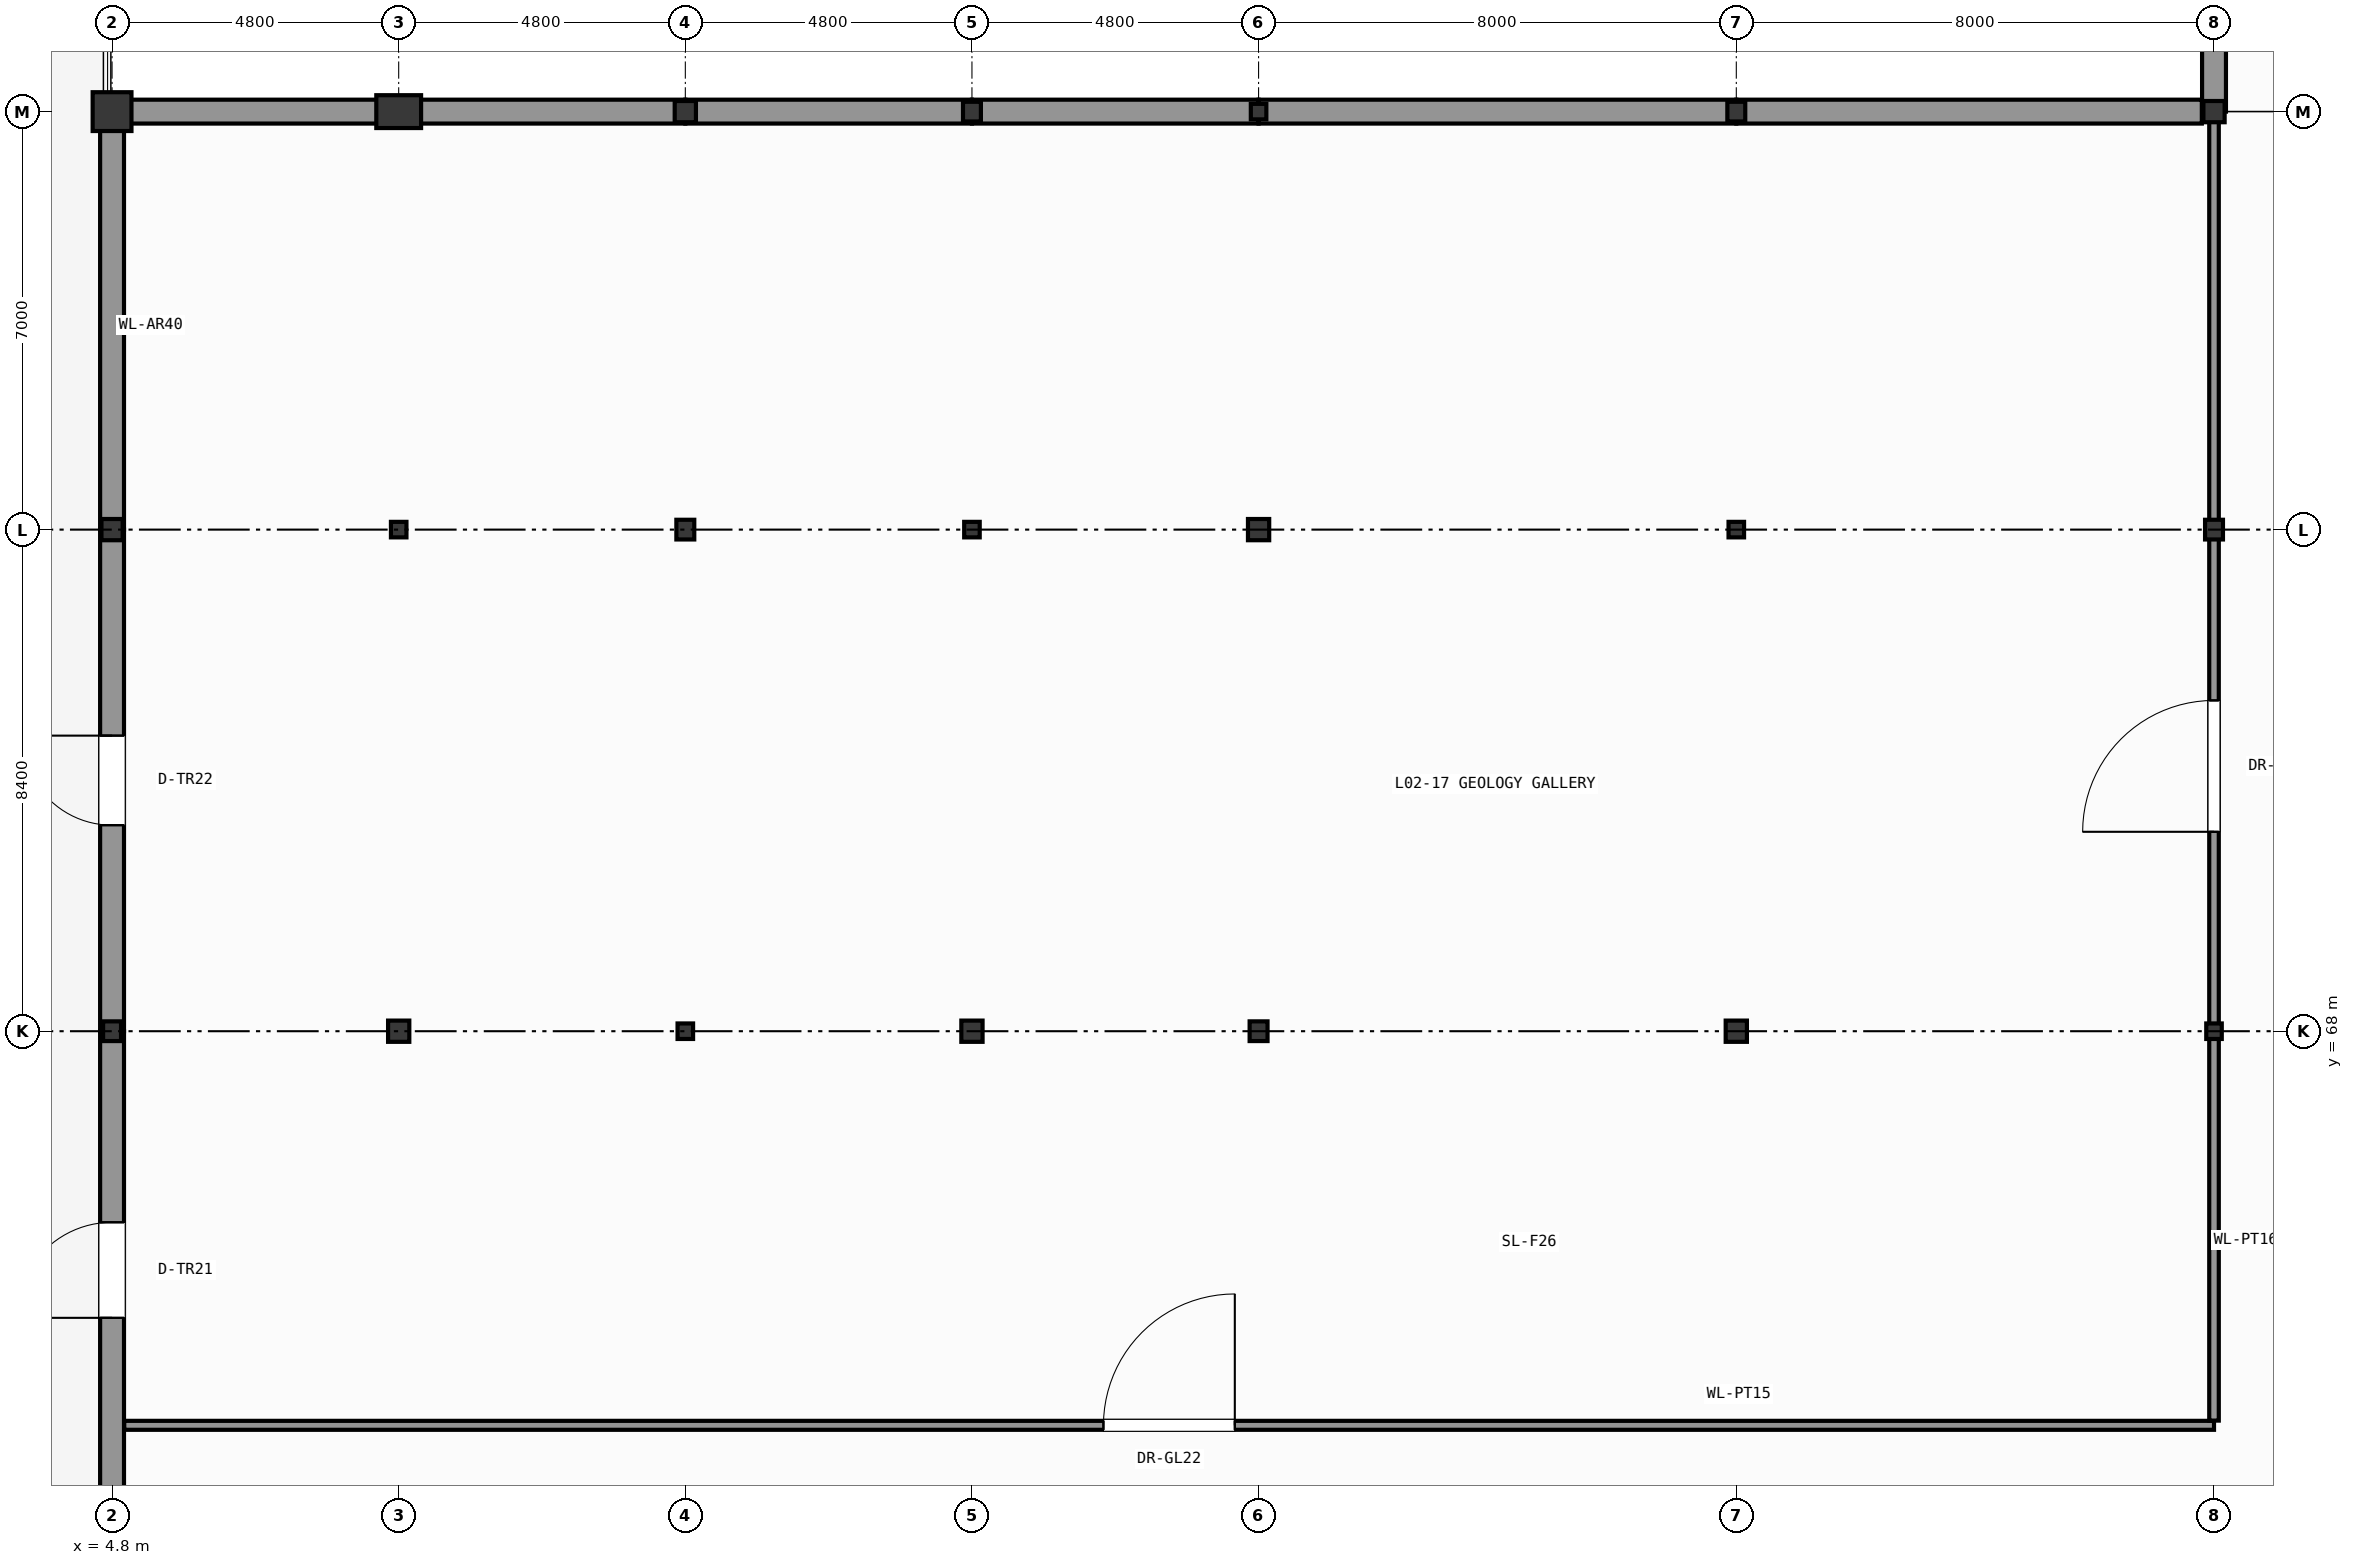
"""IFC4 building model, lengths in metres.
Left out: names, types, materials, properties, quantities, classifications, styles, units other than length and angle.
Written with IfcOpenShell. Run it as: python <this file> out.ifc"""

import sys

from ifc_helpers import new_model, si_unit, direction, frame, frame_2d, origin, origin_2d, place, context, subcontext, project, spatial, rectangle, hollow_rectangle, hollow_circle, i_section, extrude, element, fill, save


model = new_model("IFC4")
c1 = context("Model", 3, precision=1e-05, world=origin(), true_north=direction((0.0, 1.0)))
c2 = subcontext(c1, "Body", "Model", "MODEL_VIEW")
j1 = project(units=[si_unit("LENGTHUNIT", "METRE"), si_unit("PLANEANGLEUNIT", "RADIAN")], contexts=[c1])
p1 = place(None, origin())
s1 = spatial("IfcSite", under=j1, at=p1, CompositionType="ELEMENT")
p2 = place(p1, origin())
s2 = spatial("IfcBuilding", under=s1, at=p2, CompositionType="ELEMENT")
p3 = place(p2, frame((0.0, 0.0, 7.8)))
s3 = spatial("IfcBuildingStorey", under=s2, at=p3, CompositionType="ELEMENT", Elevation=7.8)
p4 = place(p3, frame((4.8, 68.0, 0.0), z_axis=(0.0, 0.0, 1.0), x_axis=(1.0, 0.0, 0.0)))
e1 = element("IfcColumn", 1, at=p4, inside=s3, PredefinedType="COLUMN", context=c2, shape_type="SweptSolid", body=[
    extrude(i_section(OverallWidth=0.3, OverallDepth=0.33, WebThickness=0.01, FlangeThickness=0.017, FilletRadius=0.027, at=origin_2d()), origin(), (0.0, 0.0, 1.0), 5.4),
])
p5 = place(p3, frame((4.8, 76.4, 0.0), z_axis=(0.0, 0.0, 1.0), x_axis=(1.0, 0.0, 0.0)))
e2 = element("IfcColumn", 2, at=p5, inside=s3, PredefinedType="COLUMN", context=c2, shape_type="SweptSolid", body=[
    extrude(hollow_circle(Radius=0.178, WallThickness=0.016, at=origin_2d()), origin(), (0.0, 0.0, 1.0), 5.4),
])
p6 = place(p3, frame((4.8, 83.4, 0.0), z_axis=(0.0, 0.0, 1.0), x_axis=(1.0, 0.0, 0.0)))
e3 = element("IfcColumn", 3, at=p6, inside=s3, PredefinedType="PILASTER", context=c2, shape_type="SweptSolid", body=[
    extrude(rectangle(XDim=0.65, YDim=0.65, at=origin_2d()), origin(), (0.0, 0.0, 1.0), 5.4),
])
p7 = place(p3, frame((9.6, 68.0, 0.0), z_axis=(0.0, 0.0, 1.0), x_axis=(1.0, 0.0, 0.0)))
e4 = element("IfcColumn", 4, at=p7, inside=s3, PredefinedType="COLUMN", context=c2, shape_type="SweptSolid", body=[
    extrude(hollow_circle(Radius=0.178, WallThickness=0.016, at=origin_2d()), origin(), (0.0, 0.0, 1.0), 5.4),
])
p8 = place(p3, frame((9.6, 76.4, 0.0), z_axis=(0.0, 0.0, 1.0), x_axis=(1.0, 0.0, 0.0)))
e5 = element("IfcColumn", 5, at=p8, inside=s3, PredefinedType="COLUMN", context=c2, shape_type="SweptSolid", body=[
    extrude(hollow_rectangle(XDim=0.26, YDim=0.26, WallThickness=0.012, InnerFilletRadius=0.012, OuterFilletRadius=0.025, at=origin_2d()), origin(), (0.0, 0.0, 1.0), 5.4),
])
p9 = place(p3, frame((9.6, 83.4, 0.0), z_axis=(0.0, 0.0, 1.0), x_axis=(1.0, 0.0, 0.0)))
e6 = element("IfcColumn", 6, at=p9, inside=s3, PredefinedType="PILASTER", context=c2, shape_type="SweptSolid", body=[
    extrude(rectangle(XDim=0.75, YDim=0.55, at=origin_2d()), origin(), (0.0, 0.0, 1.0), 5.4),
])
p10 = place(p3, frame((14.4, 68.0, 0.0), z_axis=(0.0, 0.0, 1.0), x_axis=(1.0, 0.0, 0.0)))
e7 = element("IfcColumn", 7, at=p10, inside=s3, PredefinedType="COLUMN", context=c2, shape_type="SweptSolid", body=[
    extrude(hollow_rectangle(XDim=0.26, YDim=0.26, WallThickness=0.012, InnerFilletRadius=0.012, OuterFilletRadius=0.025, at=origin_2d()), origin(), (0.0, 0.0, 1.0), 5.4),
])
p11 = place(p3, frame((14.4, 76.4, 0.0), z_axis=(0.0, 0.0, 1.0), x_axis=(1.0, 0.0, 0.0)))
e8 = element("IfcColumn", 8, at=p11, inside=s3, PredefinedType="COLUMN", context=c2, shape_type="SweptSolid", body=[
    extrude(i_section(OverallWidth=0.3, OverallDepth=0.33, WebThickness=0.01, FlangeThickness=0.017, FilletRadius=0.027, at=origin_2d()), origin(), (0.0, 0.0, 1.0), 5.4),
])
for number, where, z_axis, x_axis in (
    (9, (14.4, 83.4, 0.0), (0.0, 0.0, 1.0), (1.0, 0.0, 0.0)),
    (10, (19.2, 68.0, 0.0), (0.0, 0.0, 1.0), (1.0, 0.0, 0.0)),
):
    element("IfcColumn", number, at=place(p3, frame(where, z_axis=z_axis, x_axis=x_axis)), inside=s3, PredefinedType="COLUMN", context=c2, shape_type="SweptSolid", body=[
        extrude(hollow_circle(Radius=0.178, WallThickness=0.016, at=origin_2d()), origin(), (0.0, 0.0, 1.0), 5.4),
    ])
p12 = place(p3, frame((19.2, 76.4, 0.0), z_axis=(0.0, 0.0, 1.0), x_axis=(1.0, 0.0, 0.0)))
e11 = element("IfcColumn", 11, at=p12, inside=s3, PredefinedType="COLUMN", context=c2, shape_type="SweptSolid", body=[
    extrude(hollow_rectangle(XDim=0.26, YDim=0.26, WallThickness=0.012, InnerFilletRadius=0.012, OuterFilletRadius=0.025, at=origin_2d()), origin(), (0.0, 0.0, 1.0), 5.4),
])
for number, where, z_axis, x_axis in (
    (12, (19.2, 83.4, 0.0), (0.0, 0.0, 1.0), (1.0, 0.0, 0.0)),
    (13, (24.0, 68.0, 0.0), (0.0, 0.0, 1.0), (1.0, 0.0, 0.0)),
):
    element("IfcColumn", number, at=place(p3, frame(where, z_axis=z_axis, x_axis=x_axis)), inside=s3, PredefinedType="COLUMN", context=c2, shape_type="SweptSolid", body=[
        extrude(i_section(OverallWidth=0.3, OverallDepth=0.33, WebThickness=0.01, FlangeThickness=0.017, FilletRadius=0.027, at=origin_2d()), origin(), (0.0, 0.0, 1.0), 5.4),
    ])
p13 = place(p3, frame((24.0, 76.4, 0.0), z_axis=(0.0, 0.0, 1.0), x_axis=(1.0, 0.0, 0.0)))
e14 = element("IfcColumn", 14, at=p13, inside=s3, PredefinedType="COLUMN", context=c2, shape_type="SweptSolid", body=[
    extrude(hollow_circle(Radius=0.178, WallThickness=0.016, at=origin_2d()), origin(), (0.0, 0.0, 1.0), 5.4),
])
p14 = place(p3, frame((24.0, 83.4, 0.0), z_axis=(0.0, 0.0, 1.0), x_axis=(1.0, 0.0, 0.0)))
e15 = element("IfcColumn", 15, at=p14, inside=s3, PredefinedType="COLUMN", context=c2, shape_type="SweptSolid", body=[
    extrude(hollow_rectangle(XDim=0.26, YDim=0.26, WallThickness=0.012, InnerFilletRadius=0.012, OuterFilletRadius=0.025, at=origin_2d()), origin(), (0.0, 0.0, 1.0), 5.4),
])
p15 = place(p3, frame((32.0, 68.0, 0.0), z_axis=(0.0, 0.0, 1.0), x_axis=(1.0, 0.0, 0.0)))
e16 = element("IfcColumn", 16, at=p15, inside=s3, PredefinedType="COLUMN", context=c2, shape_type="SweptSolid", body=[
    extrude(hollow_circle(Radius=0.178, WallThickness=0.016, at=origin_2d()), origin(), (0.0, 0.0, 1.0), 5.4),
])
p16 = place(p3, frame((32.0, 76.4, 0.0), z_axis=(0.0, 0.0, 1.0), x_axis=(1.0, 0.0, 0.0)))
e17 = element("IfcColumn", 17, at=p16, inside=s3, PredefinedType="COLUMN", context=c2, shape_type="SweptSolid", body=[
    extrude(hollow_rectangle(XDim=0.26, YDim=0.26, WallThickness=0.012, InnerFilletRadius=0.012, OuterFilletRadius=0.025, at=origin_2d()), origin(), (0.0, 0.0, 1.0), 5.4),
])
p17 = place(p3, frame((32.0, 83.4, 0.0), z_axis=(0.0, 0.0, 1.0), x_axis=(1.0, 0.0, 0.0)))
e18 = element("IfcColumn", 18, at=p17, inside=s3, PredefinedType="COLUMN", context=c2, shape_type="SweptSolid", body=[
    extrude(i_section(OverallWidth=0.3, OverallDepth=0.33, WebThickness=0.01, FlangeThickness=0.017, FilletRadius=0.027, at=origin_2d()), origin(), (0.0, 0.0, 1.0), 5.4),
])
p18 = place(p3, frame((40.0, 68.0, 0.0), z_axis=(0.0, 0.0, 1.0), x_axis=(1.0, 0.0, 0.0)))
e19 = element("IfcColumn", 19, at=p18, inside=s3, PredefinedType="COLUMN", context=c2, shape_type="SweptSolid", body=[
    extrude(hollow_rectangle(XDim=0.26, YDim=0.26, WallThickness=0.012, InnerFilletRadius=0.012, OuterFilletRadius=0.025, at=origin_2d()), origin(), (0.0, 0.0, 1.0), 5.4),
])
p19 = place(p3, frame((40.0, 76.4, 0.0), z_axis=(0.0, 0.0, 1.0), x_axis=(1.0, 0.0, 0.0)))
e20 = element("IfcColumn", 20, at=p19, inside=s3, PredefinedType="COLUMN", context=c2, shape_type="SweptSolid", body=[
    extrude(i_section(OverallWidth=0.3, OverallDepth=0.33, WebThickness=0.01, FlangeThickness=0.017, FilletRadius=0.027, at=origin_2d()), origin(), (0.0, 0.0, 1.0), 5.4),
])
p20 = place(p3, frame((40.0, 83.4, 0.0), z_axis=(0.0, 0.0, 1.0), x_axis=(1.0, 0.0, 0.0)))
e21 = element("IfcColumn", 21, at=p20, inside=s3, PredefinedType="COLUMN", context=c2, shape_type="SweptSolid", body=[
    extrude(hollow_circle(Radius=0.178, WallThickness=0.016, at=origin_2d()), origin(), (0.0, 0.0, 1.0), 5.4),
])
p21 = place(p3, frame((40.0, 83.4, 0.0), z_axis=(0.0, 0.0, 1.0), x_axis=(0.0, 1.0, 0.0)))
e22 = element("IfcWall", 22, at=p21, inside=s3, PredefinedType="SOLIDWALL", context=c2, shape_type="SweptSolid", body=[
    extrude(rectangle(XDim=7.0, YDim=0.4, at=frame_2d((3.5, 0.0))), origin(), (0.0, 0.0, 1.0), 5.15),
])
p22 = place(p3, frame((32.0, 83.4, 0.0), z_axis=(0.0, 0.0, 1.0), x_axis=(1.0, 0.0, 0.0)))
e23 = element("IfcWall", 23, at=p22, inside=s3, PredefinedType="SOLIDWALL", context=c2, shape_type="SweptSolid", body=[
    extrude(rectangle(XDim=7.796, YDim=0.4, at=frame_2d((3.898, 0.0))), origin(), (0.0, 0.0, 1.0), 5.15),
])
p23 = place(p3, frame((24.0, 83.4, 0.0), z_axis=(0.0, 0.0, 1.0), x_axis=(1.0, 0.0, 0.0)))
e24 = element("IfcWall", 24, at=p23, inside=s3, PredefinedType="SOLIDWALL", context=c2, shape_type="SweptSolid", body=[
    extrude(rectangle(XDim=8.0, YDim=0.4, at=frame_2d((4.0, 0.0))), origin(), (0.0, 0.0, 1.0), 5.15),
])
for number, where, z_axis, x_axis in (
    (25, (19.2, 83.4, 0.0), (0.0, 0.0, 1.0), (1.0, 0.0, 0.0)),
    (26, (14.4, 83.4, 0.0), (0.0, 0.0, 1.0), (1.0, 0.0, 0.0)),
):
    element("IfcWall", number, at=place(p3, frame(where, z_axis=z_axis, x_axis=x_axis)), inside=s3, PredefinedType="SOLIDWALL", context=c2, shape_type="SweptSolid", body=[
        extrude(rectangle(XDim=4.8, YDim=0.4, at=frame_2d((2.4, 0.0))), origin(), (0.0, 0.0, 1.0), 5.15),
    ])
p24 = place(p3, frame((9.6, 83.4, 0.0), z_axis=(0.0, 0.0, 1.0), x_axis=(1.0, 0.0, 0.0)))
e27 = element("IfcWall", 27, at=p24, inside=s3, PredefinedType="SOLIDWALL", context=c2, shape_type="SweptSolid", body=[
    extrude(rectangle(XDim=4.8, YDim=0.4, at=frame_2d((2.4, 0.0))), origin(), (0.0, 0.0, 1.0), 5.15),
])
p25 = place(p3, frame((4.8, 83.4, 0.0), z_axis=(0.0, 0.0, 1.0), x_axis=(1.0, 0.0, 0.0)))
e28 = element("IfcWall", 28, at=p25, inside=s3, PredefinedType="SOLIDWALL", context=c2, shape_type="SweptSolid", body=[
    extrude(rectangle(XDim=4.8, YDim=0.4, at=frame_2d((2.4, 0.0))), origin(), (0.0, 0.0, 1.0), 5.15),
])
p26 = place(p3, frame((4.8, 76.4, 0.0), z_axis=(0.0, 0.0, 1.0), x_axis=(0.0, 1.0, 0.0)))
e29 = element("IfcWall", 29, at=p26, inside=s3, PredefinedType="SOLIDWALL", context=c2, shape_type="SweptSolid", body=[
    extrude(rectangle(XDim=6.796, YDim=0.4, at=frame_2d((3.398, 0.0))), origin(), (0.0, 0.0, 1.0), 5.15),
])
p27 = place(p3, frame((4.8, 68.0, 0.0), z_axis=(0.0, 0.0, 1.0), x_axis=(0.0, 1.0, 0.0)))
e30 = element("IfcWall", 30, at=p27, inside=s3, PredefinedType="SOLIDWALL", context=c2, shape_type="SweptSolid", body=[
    extrude(rectangle(XDim=8.4, YDim=0.4, at=frame_2d((4.2, 0.0))), origin(), (0.0, 0.0, 1.0), 5.15),
])
p28 = place(p27, frame((3.45, 0.0, 0.0)))
e31 = element("IfcOpeningElement", 31, at=p28, cuts=e30, PredefinedType="OPENING", context=c2, shape_type="SweptSolid", body=[
    extrude(rectangle(XDim=1.5, YDim=2.3, at=frame_2d((0.75, 1.15))), frame((0.0, 0.21, 0.0), z_axis=(0.0, -1.0, 0.0), x_axis=(1.0, 0.0, 0.0)), (0.0, 0.0, 1.0), 0.42),
])
p29 = place(p3, frame((4.8, 59.6, 0.0), z_axis=(0.0, 0.0, 1.0), x_axis=(0.0, 1.0, 0.0)))
e32 = element("IfcWall", 32, at=p29, inside=s3, PredefinedType="SOLIDWALL", context=c2, shape_type="SweptSolid", body=[
    extrude(rectangle(XDim=8.4, YDim=0.4, at=frame_2d((4.2, 0.0))), origin(), (0.0, 0.0, 1.0), 5.15),
])
p30 = place(p29, frame((3.6, 0.0, 0.0)))
e33 = element("IfcOpeningElement", 33, at=p30, cuts=e32, PredefinedType="OPENING", context=c2, shape_type="SweptSolid", body=[
    extrude(rectangle(XDim=1.6, YDim=2.4, at=frame_2d((0.8, 1.2))), frame((0.0, 0.21, 0.0), z_axis=(0.0, -1.0, 0.0), x_axis=(1.0, 0.0, 0.0)), (0.0, 0.0, 1.0), 0.42),
])
p31 = place(p3, frame((5.004, 61.4, 0.0), z_axis=(0.0, 0.0, 1.0), x_axis=(1.0, 0.0, 0.0)))
e34 = element("IfcWall", 34, at=p31, inside=s3, PredefinedType="PARTITIONING", context=c2, shape_type="SweptSolid", body=[
    extrude(rectangle(XDim=34.996, YDim=0.15, at=frame_2d((17.498, 0.0))), origin(), (0.0, 0.0, 1.0), 5.15),
])
p32 = place(p31, frame((16.398, 0.0, 0.0)))
e35 = element("IfcOpeningElement", 35, at=p32, cuts=e34, PredefinedType="OPENING", context=c2, shape_type="SweptSolid", body=[
    extrude(rectangle(XDim=2.2, YDim=2.6, at=frame_2d((1.1, 1.3))), frame((0.0, 0.085, 0.0), z_axis=(0.0, -1.0, 0.0), x_axis=(1.0, 0.0, 0.0)), (0.0, 0.0, 1.0), 0.17),
])
p33 = place(p3, frame((40.0, 61.479, 0.0), z_axis=(0.0, 0.0, 1.0), x_axis=(0.0, 1.0, 0.0)))
e36 = element("IfcWall", 36, at=p33, inside=s3, PredefinedType="PARTITIONING", context=c2, shape_type="SweptSolid", body=[
    extrude(rectangle(XDim=21.921, YDim=0.16, at=frame_2d((10.96, 0.0))), origin(), (0.0, 0.0, 1.0), 4.635),
])
p34 = place(p33, frame((9.861, 0.0, 0.0)))
e37 = element("IfcOpeningElement", 37, at=p34, cuts=e36, PredefinedType="OPENING", context=c2, shape_type="SweptSolid", body=[
    extrude(rectangle(XDim=2.2, YDim=2.6, at=frame_2d((1.1, 1.3))), frame((0.0, 0.09, 0.0), z_axis=(0.0, -1.0, 0.0), x_axis=(1.0, 0.0, 0.0)), (0.0, 0.0, 1.0), 0.18),
])
p35 = place(p28, origin())
e38 = element("IfcDoor", 38, at=p35, inside=s3, OperationType="SINGLE_SWING_RIGHT", PredefinedType="DOOR", context=c2, shape_type="SweptSolid", body=[
    extrude(rectangle(XDim=1.5, YDim=2.3, at=frame_2d((0.75, 1.15))), frame((0.0, 0.025, 0.0), z_axis=(0.0, -1.0, 0.0), x_axis=(1.0, 0.0, 0.0)), (0.0, 0.0, 1.0), 0.05),
])
fill(e31, e38)
p36 = place(p30, origin())
e39 = element("IfcDoor", 39, at=p36, inside=s3, OperationType="SINGLE_SWING_LEFT", PredefinedType="DOOR", context=c2, shape_type="SweptSolid", body=[
    extrude(rectangle(XDim=1.6, YDim=2.4, at=frame_2d((0.8, 1.2))), frame((0.0, 0.025, 0.0), z_axis=(0.0, -1.0, 0.0), x_axis=(1.0, 0.0, 0.0)), (0.0, 0.0, 1.0), 0.05),
])
fill(e33, e39)
p37 = place(p32, origin())
e40 = element("IfcDoor", 40, at=p37, inside=s3, OperationType="SINGLE_SWING_RIGHT", PredefinedType="DOOR", context=c2, shape_type="SweptSolid", body=[
    extrude(rectangle(XDim=2.2, YDim=2.6, at=frame_2d((1.1, 1.3))), frame((0.0, 0.025, 0.0), z_axis=(0.0, -1.0, 0.0), x_axis=(1.0, 0.0, 0.0)), (0.0, 0.0, 1.0), 0.05),
])
fill(e35, e40)
p38 = place(p34, origin())
e41 = element("IfcDoor", 41, at=p38, inside=s3, OperationType="SINGLE_SWING_LEFT", PredefinedType="DOOR", context=c2, shape_type="SweptSolid", body=[
    extrude(rectangle(XDim=2.2, YDim=2.6, at=frame_2d((1.1, 1.3))), frame((0.0, 0.025, 0.0), z_axis=(0.0, -1.0, 0.0), x_axis=(1.0, 0.0, 0.0)), (0.0, 0.0, 1.0), 0.05),
])
fill(e37, e41)
save(model, sys.argv[1])
